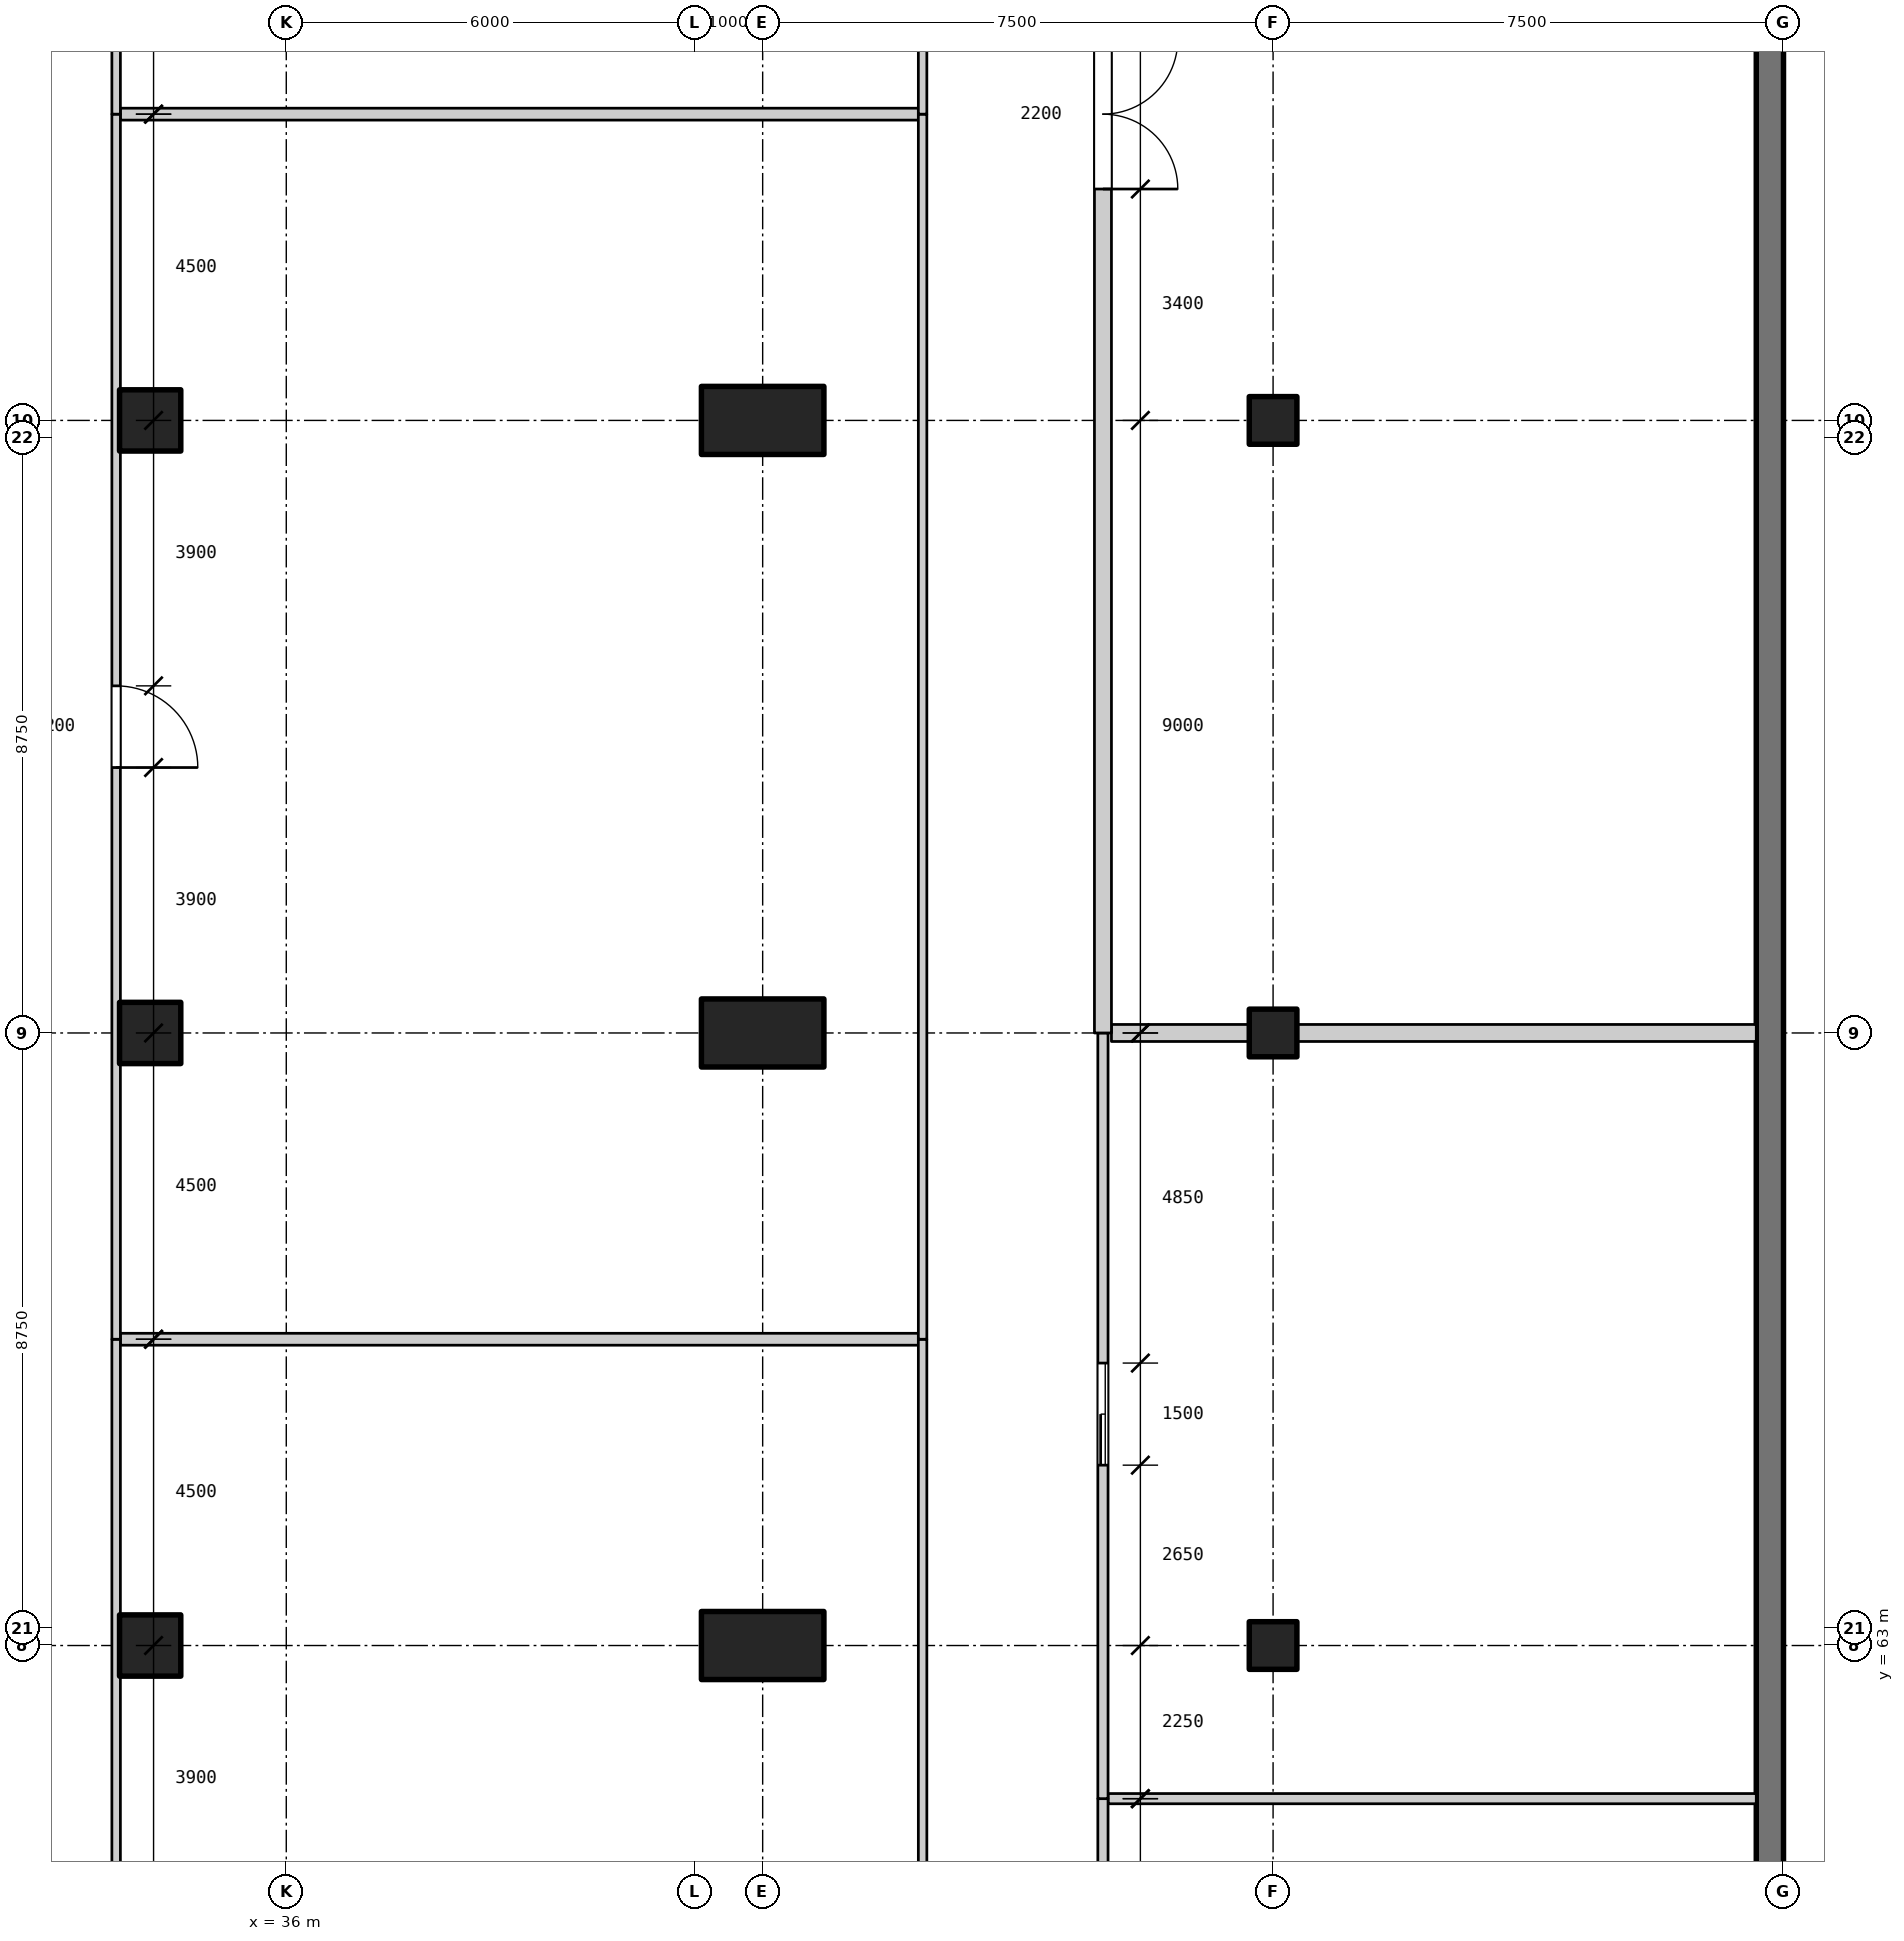
"""IFC4 building model, lengths in metres.
Left out: names, types, materials, properties, quantities, classifications, styles, units other than length and angle.
Written with IfcOpenShell. Run it as: python <this file> out.ifc"""

import sys

from ifc_helpers import new_model, si_unit, direction, frame, frame_2d, origin, origin_2d, place, context, subcontext, project, spatial, rectangle, extrude, element, fill, save


model = new_model("IFC4")
c1 = context("Model", 3, precision=1e-05, world=origin(), true_north=direction((0.0, 1.0)))
c2 = subcontext(c1, "Body", "Model", "MODEL_VIEW")
j1 = project(units=[si_unit("LENGTHUNIT", "METRE"), si_unit("PLANEANGLEUNIT", "RADIAN")], contexts=[c1])
p1 = place(None, origin())
s1 = spatial("IfcSite", under=j1, at=p1, CompositionType="ELEMENT")
p2 = place(p1, origin())
s2 = spatial("IfcBuilding", under=s1, at=p2, CompositionType="ELEMENT")
p3 = place(p2, frame((0.0, 0.0, -10.0)))
s3 = spatial("IfcBuildingStorey", under=s2, at=p3, CompositionType="ELEMENT", Elevation=-10.0)
for number, where, z_axis, x_axis in (
    (1, (34.0, 63.0, -1.4), (0.0, 0.0, 1.0), (1.0, 0.0, 0.0)),
    (2, (34.0, 72.0, -1.4), (0.0, 0.0, 1.0), (1.0, 0.0, 0.0)),
    (3, (34.0, 81.0, -1.4), (0.0, 0.0, 1.0), (1.0, 0.0, 0.0)),
):
    element("IfcColumn", number, at=place(p3, frame(where, z_axis=z_axis, x_axis=x_axis)), inside=s3, PredefinedType="COLUMN", context=c2, shape_type="SweptSolid", body=[
        extrude(rectangle(XDim=0.9, YDim=0.9, at=origin_2d()), origin(), (0.0, 0.0, 1.0), 6.4),
    ])
for number, where, z_axis, x_axis in (
    (4, (50.5, 63.0, -1.4), (0.0, 0.0, 1.0), (1.0, 0.0, 0.0)),
    (5, (50.5, 72.0, -1.4), (0.0, 0.0, 1.0), (1.0, 0.0, 0.0)),
    (6, (50.5, 81.0, -1.4), (0.0, 0.0, 1.0), (1.0, 0.0, 0.0)),
):
    element("IfcColumn", number, at=place(p3, frame(where, z_axis=z_axis, x_axis=x_axis)), inside=s3, PredefinedType="COLUMN", context=c2, shape_type="SweptSolid", body=[
        extrude(rectangle(XDim=0.7, YDim=0.7, at=origin_2d()), origin(), (0.0, 0.0, 1.0), 6.4),
    ])
p4 = place(p3, frame((57.8, 18.0, -1.4), z_axis=(0.0, 0.0, 1.0), x_axis=(0.0, 1.0, 0.0)))
e7 = element("IfcWall", 7, at=p4, inside=s3, PredefinedType="SOLIDWALL", context=c2, shape_type="SweptSolid", body=[
    extrude(rectangle(XDim=108.0, YDim=0.4, at=frame_2d((54.0, 0.0))), origin(), (0.0, 0.0, 1.0), 6.4),
])
for number, where, z_axis, x_axis in (
    (8, (43.0, 63.0, -1.4), (0.0, 0.0, 1.0), (1.0, 0.0, 0.0)),
    (9, (43.0, 72.0, -1.4), (0.0, 0.0, 1.0), (1.0, 0.0, 0.0)),
    (10, (43.0, 81.0, -1.4), (0.0, 0.0, 1.0), (1.0, 0.0, 0.0)),
):
    element("IfcColumn", number, at=place(p3, frame(where, z_axis=z_axis, x_axis=x_axis)), inside=s3, PredefinedType="COLUMN", context=c2, shape_type="SweptSolid", body=[
        extrude(rectangle(XDim=1.8, YDim=1.0, at=origin_2d()), origin(), (0.0, 0.0, 1.0), 6.4),
    ])
p5 = place(p3, frame((48.075, 60.75, 0.0), z_axis=(0.0, 0.0, 1.0), x_axis=(1.0, 0.0, 0.0)))
e11 = element("IfcWall", 11, at=p5, inside=s3, PredefinedType="PARTITIONING", context=c2, shape_type="SweptSolid", body=[
    extrude(rectangle(XDim=9.525, YDim=0.15, at=frame_2d((4.763, 0.0))), origin(), (0.0, 0.0, 1.0), 4.75),
])
p6 = place(p3, frame((33.562, 67.5, 0.0), z_axis=(0.0, 0.0, 1.0), x_axis=(1.0, 0.0, 0.0)))
e12 = element("IfcWall", 12, at=p6, inside=s3, PredefinedType="PARTITIONING", context=c2, shape_type="SweptSolid", body=[
    extrude(rectangle(XDim=11.725, YDim=0.175, at=frame_2d((5.863, 0.0))), origin(), (0.0, 0.0, 1.0), 4.75),
])
p7 = place(p3, frame((48.125, 72.0, 0.0), z_axis=(0.0, 0.0, 1.0), x_axis=(1.0, 0.0, 0.0)))
e13 = element("IfcWall", 13, at=p7, inside=s3, PredefinedType="PARTITIONING", context=c2, shape_type="SweptSolid", body=[
    extrude(rectangle(XDim=2.025, YDim=0.25, at=frame_2d((1.012, 0.0))), origin(), (0.0, 0.0, 1.0), 4.05),
])
p8 = place(p3, frame((50.85, 72.0, 0.0), z_axis=(0.0, 0.0, 1.0), x_axis=(1.0, 0.0, 0.0)))
e14 = element("IfcWall", 14, at=p8, inside=s3, PredefinedType="PARTITIONING", context=c2, shape_type="SweptSolid", body=[
    extrude(rectangle(XDim=6.75, YDim=0.25, at=frame_2d((3.375, 0.0))), origin(), (0.0, 0.0, 1.0), 4.05),
])
p9 = place(p3, frame((33.562, 85.5, 0.0), z_axis=(0.0, 0.0, 1.0), x_axis=(1.0, 0.0, 0.0)))
e15 = element("IfcWall", 15, at=p9, inside=s3, PredefinedType="PARTITIONING", context=c2, shape_type="SweptSolid", body=[
    extrude(rectangle(XDim=11.725, YDim=0.175, at=frame_2d((5.863, 0.0))), origin(), (0.0, 0.0, 1.0), 4.75),
])
p10 = place(p3, frame((33.5, 49.5, 0.0), z_axis=(0.0, 0.0, 1.0), x_axis=(0.0, 1.0, 0.0)))
e16 = element("IfcWall", 16, at=p10, inside=s3, PredefinedType="PARTITIONING", context=c2, shape_type="SweptSolid", body=[
    extrude(rectangle(XDim=18.0, YDim=0.125, at=frame_2d((9.0, 0.0))), origin(), (0.0, 0.0, 1.0), 4.75),
])
p11 = place(p10, frame((8.4, 0.0, 0.0)))
e17 = element("IfcOpeningElement", 17, at=p11, cuts=e16, PredefinedType="OPENING", context=c2, shape_type="SweptSolid", body=[
    extrude(rectangle(XDim=1.2, YDim=2.1, at=frame_2d((0.6, 1.05))), frame((0.0, 0.073, 0.0), z_axis=(0.0, -1.0, 0.0), x_axis=(1.0, 0.0, 0.0)), (0.0, 0.0, 1.0), 0.145),
])
p12 = place(p3, frame((33.5, 67.5, 0.0), z_axis=(0.0, 0.0, 1.0), x_axis=(0.0, 1.0, 0.0)))
e18 = element("IfcWall", 18, at=p12, inside=s3, PredefinedType="PARTITIONING", context=c2, shape_type="SweptSolid", body=[
    extrude(rectangle(XDim=18.0, YDim=0.125, at=frame_2d((9.0, 0.0))), origin(), (0.0, 0.0, 1.0), 4.75),
])
p13 = place(p12, frame((8.4, 0.0, 0.0)))
e19 = element("IfcOpeningElement", 19, at=p13, cuts=e18, PredefinedType="OPENING", context=c2, shape_type="SweptSolid", body=[
    extrude(rectangle(XDim=1.2, YDim=2.1, at=frame_2d((0.6, 1.05))), frame((0.0, 0.073, 0.0), z_axis=(0.0, -1.0, 0.0), x_axis=(1.0, 0.0, 0.0)), (0.0, 0.0, 1.0), 0.145),
])
p14 = place(p3, frame((33.5, 85.5, 0.0), z_axis=(0.0, 0.0, 1.0), x_axis=(0.0, 1.0, 0.0)))
e20 = element("IfcWall", 20, at=p14, inside=s3, PredefinedType="PARTITIONING", context=c2, shape_type="SweptSolid", body=[
    extrude(rectangle(XDim=13.5, YDim=0.125, at=frame_2d((6.75, 0.0))), origin(), (0.0, 0.0, 1.0), 4.75),
])
p15 = place(p14, frame((6.15, 0.0, 0.0)))
e21 = element("IfcOpeningElement", 21, at=p15, cuts=e20, PredefinedType="OPENING", context=c2, shape_type="SweptSolid", body=[
    extrude(rectangle(XDim=1.2, YDim=2.1, at=frame_2d((0.6, 1.05))), frame((0.0, 0.073, 0.0), z_axis=(0.0, -1.0, 0.0), x_axis=(1.0, 0.0, 0.0)), (0.0, 0.0, 1.0), 0.145),
])
for number, where, z_axis, x_axis in (
    (22, (45.35, 49.5, 0.0), (0.0, 0.0, 1.0), (0.0, 1.0, 0.0)),
    (23, (45.35, 67.5, 0.0), (0.0, 0.0, 1.0), (0.0, 1.0, 0.0)),
):
    element("IfcWall", number, at=place(p3, frame(where, z_axis=z_axis, x_axis=x_axis)), inside=s3, PredefinedType="PARTITIONING", context=c2, shape_type="SweptSolid", body=[
        extrude(rectangle(XDim=18.0, YDim=0.125, at=frame_2d((9.0, 0.0))), origin(), (0.0, 0.0, 1.0), 4.75),
    ])
p16 = place(p3, frame((45.35, 85.5, 0.0), z_axis=(0.0, 0.0, 1.0), x_axis=(0.0, 1.0, 0.0)))
e24 = element("IfcWall", 24, at=p16, inside=s3, PredefinedType="PARTITIONING", context=c2, shape_type="SweptSolid", body=[
    extrude(rectangle(XDim=13.5, YDim=0.125, at=frame_2d((6.75, 0.0))), origin(), (0.0, 0.0, 1.0), 4.75),
])
p17 = place(p3, frame((48.0, 49.5, 0.0), z_axis=(0.0, 0.0, 1.0), x_axis=(0.0, 1.0, 0.0)))
e25 = element("IfcWall", 25, at=p17, inside=s3, PredefinedType="PARTITIONING", context=c2, shape_type="SweptSolid", body=[
    extrude(rectangle(XDim=11.25, YDim=0.15, at=frame_2d((5.625, 0.0))), origin(), (0.0, 0.0, 1.0), 4.75),
])
p18 = place(p17, frame((4.9, 0.0, 0.0)))
e26 = element("IfcOpeningElement", 26, at=p18, cuts=e25, PredefinedType="OPENING", context=c2, shape_type="SweptSolid", body=[
    extrude(rectangle(XDim=1.5, YDim=2.4, at=frame_2d((0.75, 1.2))), frame((0.0, 0.085, 0.0), z_axis=(0.0, -1.0, 0.0), x_axis=(1.0, 0.0, 0.0)), (0.0, 0.0, 1.0), 0.17),
])
p19 = place(p3, frame((48.0, 60.75, 0.0), z_axis=(0.0, 0.0, 1.0), x_axis=(0.0, 1.0, 0.0)))
e27 = element("IfcWall", 27, at=p19, inside=s3, PredefinedType="PARTITIONING", context=c2, shape_type="SweptSolid", body=[
    extrude(rectangle(XDim=11.25, YDim=0.15, at=frame_2d((5.625, 0.0))), origin(), (0.0, 0.0, 1.0), 4.75),
])
p20 = place(p19, frame((4.9, 0.0, 0.0)))
e28 = element("IfcOpeningElement", 28, at=p20, cuts=e27, PredefinedType="OPENING", context=c2, shape_type="SweptSolid", body=[
    extrude(rectangle(XDim=1.5, YDim=2.4, at=frame_2d((0.75, 1.2))), frame((0.0, 0.085, 0.0), z_axis=(0.0, -1.0, 0.0), x_axis=(1.0, 0.0, 0.0)), (0.0, 0.0, 1.0), 0.17),
])
p21 = place(p3, frame((48.0, 72.0, 0.0), z_axis=(0.0, 0.0, 1.0), x_axis=(0.0, 1.0, 0.0)))
e29 = element("IfcWall", 29, at=p21, inside=s3, PredefinedType="PARTITIONING", context=c2, shape_type="SweptSolid", body=[
    extrude(rectangle(XDim=27.0, YDim=0.25, at=frame_2d((13.5, 0.0))), origin(), (0.0, 0.0, 1.0), 4.75),
])
p22 = place(p21, frame((12.4, 0.0, 0.0)))
e30 = element("IfcOpeningElement", 30, at=p22, cuts=e29, PredefinedType="OPENING", context=c2, shape_type="SweptSolid", body=[
    extrude(rectangle(XDim=2.2, YDim=2.4, at=frame_2d((1.1, 1.2))), frame((0.0, 0.135, 0.0), z_axis=(0.0, -1.0, 0.0), x_axis=(1.0, 0.0, 0.0)), (0.0, 0.0, 1.0), 0.27),
])
p23 = place(p20, origin())
e31 = element("IfcDoor", 31, at=p23, inside=s3, OperationType="SLIDING_TO_LEFT", PredefinedType="DOOR", context=c2, shape_type="SweptSolid", body=[
    extrude(rectangle(XDim=1.5, YDim=2.4, at=frame_2d((0.75, 1.2))), frame((0.0, 0.025, 0.0), z_axis=(0.0, -1.0, 0.0), x_axis=(1.0, 0.0, 0.0)), (0.0, 0.0, 1.0), 0.05),
])
fill(e28, e31)
p24 = place(p13, frame((1.2, 0.0, 0.0), z_axis=(0.0, 0.0, 1.0), x_axis=(-1.0, 0.0, 0.0)))
e32 = element("IfcDoor", 32, at=p24, inside=s3, OperationType="SINGLE_SWING_RIGHT", PredefinedType="DOOR", context=c2, shape_type="SweptSolid", body=[
    extrude(rectangle(XDim=1.2, YDim=2.1, at=frame_2d((0.6, 1.05))), frame((0.0, 0.025, 0.0), z_axis=(0.0, -1.0, 0.0), x_axis=(1.0, 0.0, 0.0)), (0.0, 0.0, 1.0), 0.05),
])
fill(e19, e32)
p25 = place(p22, frame((2.2, 0.0, 0.0), z_axis=(0.0, 0.0, 1.0), x_axis=(-1.0, 0.0, 0.0)))
e33 = element("IfcDoor", 33, at=p25, inside=s3, OperationType="DOUBLE_DOOR_SINGLE_SWING", PredefinedType="DOOR", context=c2, shape_type="SweptSolid", body=[
    extrude(rectangle(XDim=2.2, YDim=2.4, at=frame_2d((1.1, 1.2))), frame((0.0, 0.025, 0.0), z_axis=(0.0, -1.0, 0.0), x_axis=(1.0, 0.0, 0.0)), (0.0, 0.0, 1.0), 0.05),
])
fill(e30, e33)
save(model, sys.argv[1])
